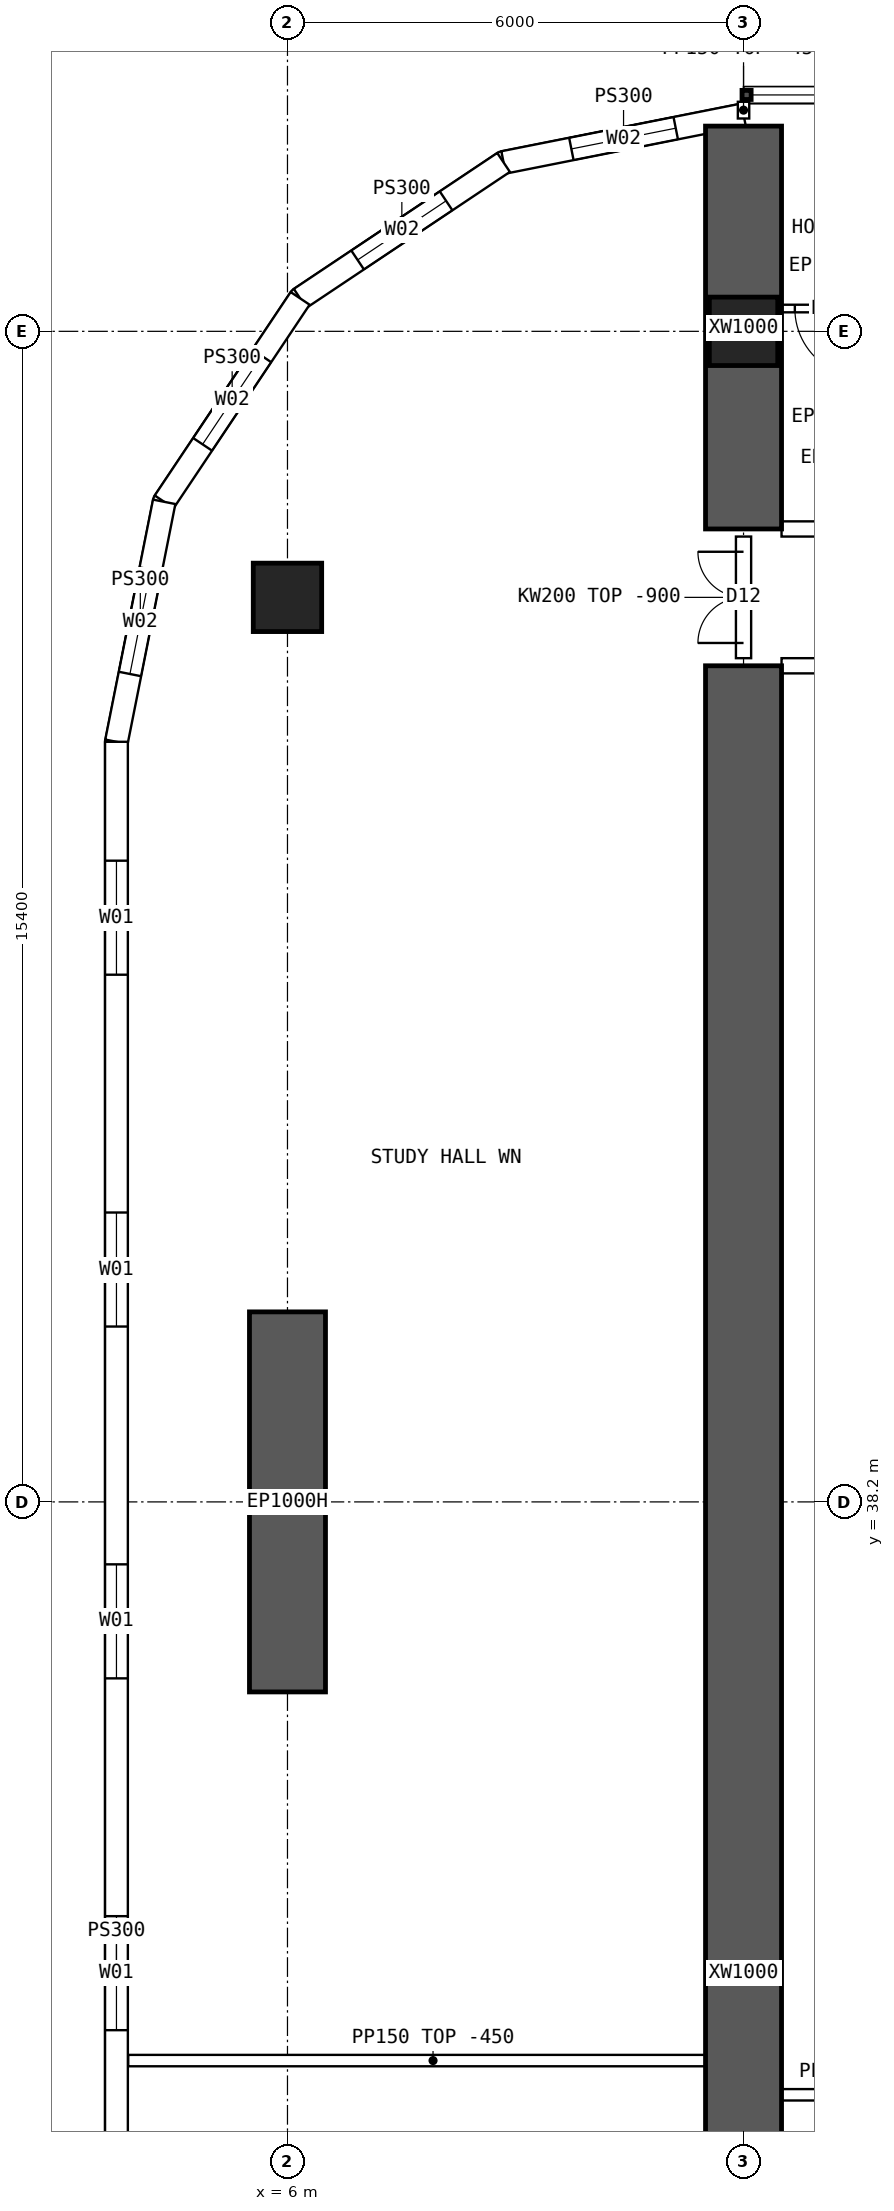
"""IFC4 building model, lengths in metres.
Left out: names, types, materials, properties, quantities, classifications, styles, units other than length and angle.
Written with IfcOpenShell. Run it as: python <this file> out.ifc"""

import sys

from ifc_helpers import new_model, si_unit, direction, frame, frame_2d, origin, origin_2d, place, context, subcontext, project, spatial, polyline, rectangle, hollow_rectangle, outline, extrude, element, fill, save


model = new_model("IFC4")
c1 = context("Model", 3, precision=1e-05, world=origin(), true_north=direction((0.0, 1.0)))
c2 = subcontext(c1, "Body", "Model", "MODEL_VIEW")
j1 = project(units=[si_unit("LENGTHUNIT", "METRE"), si_unit("PLANEANGLEUNIT", "RADIAN")], contexts=[c1])
p1 = place(None, origin())
s1 = spatial("IfcSite", under=j1, at=p1, CompositionType="ELEMENT")
p2 = place(p1, origin())
s2 = spatial("IfcBuilding", under=s1, at=p2, CompositionType="ELEMENT")
p3 = place(p2, frame((0.0, 0.0, 50.2)))
s3 = spatial("IfcBuildingStorey", under=s2, at=p3, CompositionType="ELEMENT", Elevation=50.2)
for number, where, z_axis, x_axis in (
    (1, (12.0, 53.6, 0.0), (0.0, 0.0, 1.0), (1.0, 0.0, 0.0)),
    (2, (6.0, 50.1, 0.0), (0.0, 0.0, 1.0), (1.0, 0.0, 0.0)),
):
    element("IfcColumn", number, at=place(p3, frame(where, z_axis=z_axis, x_axis=x_axis)), inside=s3, PredefinedType="COLUMN", context=c2, shape_type="SweptSolid", body=[
        extrude(hollow_rectangle(XDim=0.9, YDim=0.9, WallThickness=0.09, at=origin_2d()), origin(), (0.0, 0.0, 1.0), 3.75),
    ])
p4 = place(p3, frame((6.0, 35.7, 0.0), z_axis=(0.0, 0.0, 1.0), x_axis=(0.0, 1.0, 0.0)))
e3 = element("IfcWall", 3, at=p4, inside=s3, PredefinedType="SHEAR", context=c2, shape_type="SweptSolid", body=[
    extrude(rectangle(XDim=5.0, YDim=1.0, at=frame_2d((2.5, 0.0))), origin(), (0.0, 0.0, 1.0), 3.75),
])
p5 = place(p3, frame((12.0, 51.0, 0.0), z_axis=(0.0, 0.0, 1.0), x_axis=(0.0, 1.0, 0.0)))
e4 = element("IfcWall", 4, at=p5, inside=s3, PredefinedType="SHEAR", context=c2, shape_type="SweptSolid", body=[
    extrude(rectangle(XDim=5.3, YDim=1.0, at=frame_2d((2.65, 0.0))), origin(), (0.0, 0.0, 1.0), 3.75),
])
p6 = place(p3, frame((12.0, 14.8, 0.0), z_axis=(0.0, 0.0, 1.0), x_axis=(0.0, 1.0, 0.0)))
e5 = element("IfcWall", 5, at=p6, inside=s3, PredefinedType="SHEAR", context=c2, shape_type="SweptSolid", body=[
    extrude(rectangle(XDim=34.4, YDim=1.0, at=frame_2d((17.2, 0.0))), origin(), (0.0, 0.0, 1.0), 3.75),
])
p7 = place(p3, frame((3.75, 48.2, 0.0), z_axis=(0.0, 0.0, 1.0), x_axis=(0.0, -1.0, 0.0)))
e6 = element("IfcWall", 6, at=p7, inside=s3, PredefinedType="SOLIDWALL", context=c2, shape_type="SweptSolid", body=[
    extrude(outline(polyline([(-0.015, -0.15), (32.415, -0.15), (32.385, 0.15), (0.015, 0.15), (-0.015, -0.15)])), origin(), (0.0, 0.0, 1.0), 3.3),
])
p8 = place(p7, frame((1.564, 0.0, 0.9)))
e7 = element("IfcOpeningElement", 7, at=p8, cuts=e6, PredefinedType="OPENING", context=c2, shape_type="SweptSolid", body=[
    extrude(rectangle(XDim=1.5, YDim=2.0, at=frame_2d((0.75, 1.0))), frame((0.0, 0.16, 0.0), z_axis=(0.0, -1.0, 0.0), x_axis=(1.0, 0.0, 0.0)), (0.0, 0.0, 1.0), 0.32),
])
p9 = place(p7, frame((6.193, 0.0, 0.9)))
e8 = element("IfcOpeningElement", 8, at=p9, cuts=e6, PredefinedType="OPENING", context=c2, shape_type="SweptSolid", body=[
    extrude(rectangle(XDim=1.5, YDim=2.0, at=frame_2d((0.75, 1.0))), frame((0.0, 0.16, 0.0), z_axis=(0.0, -1.0, 0.0), x_axis=(1.0, 0.0, 0.0)), (0.0, 0.0, 1.0), 0.32),
])
p10 = place(p7, frame((10.822, 0.0, 0.9)))
e9 = element("IfcOpeningElement", 9, at=p10, cuts=e6, PredefinedType="OPENING", context=c2, shape_type="SweptSolid", body=[
    extrude(rectangle(XDim=1.5, YDim=2.0, at=frame_2d((0.75, 1.0))), frame((0.0, 0.16, 0.0), z_axis=(0.0, -1.0, 0.0), x_axis=(1.0, 0.0, 0.0)), (0.0, 0.0, 1.0), 0.32),
])
p11 = place(p7, frame((15.45, 0.0, 0.9)))
e10 = element("IfcOpeningElement", 10, at=p11, cuts=e6, PredefinedType="OPENING", context=c2, shape_type="SweptSolid", body=[
    extrude(rectangle(XDim=1.5, YDim=2.0, at=frame_2d((0.75, 1.0))), frame((0.0, 0.16, 0.0), z_axis=(0.0, -1.0, 0.0), x_axis=(1.0, 0.0, 0.0)), (0.0, 0.0, 1.0), 0.32),
])
p12 = place(p7, frame((20.079, 0.0, 0.9)))
e11 = element("IfcOpeningElement", 11, at=p12, cuts=e6, PredefinedType="OPENING", context=c2, shape_type="SweptSolid", body=[
    extrude(rectangle(XDim=1.5, YDim=2.0, at=frame_2d((0.75, 1.0))), frame((0.0, 0.16, 0.0), z_axis=(0.0, -1.0, 0.0), x_axis=(1.0, 0.0, 0.0)), (0.0, 0.0, 1.0), 0.32),
])
p13 = place(p7, frame((24.707, 0.0, 0.9)))
e12 = element("IfcOpeningElement", 12, at=p13, cuts=e6, PredefinedType="OPENING", context=c2, shape_type="SweptSolid", body=[
    extrude(rectangle(XDim=1.5, YDim=2.0, at=frame_2d((0.75, 1.0))), frame((0.0, 0.16, 0.0), z_axis=(0.0, -1.0, 0.0), x_axis=(1.0, 0.0, 0.0)), (0.0, 0.0, 1.0), 0.32),
])
p14 = place(p7, frame((29.336, 0.0, 0.9)))
e13 = element("IfcOpeningElement", 13, at=p14, cuts=e6, PredefinedType="OPENING", context=c2, shape_type="SweptSolid", body=[
    extrude(rectangle(XDim=1.5, YDim=2.0, at=frame_2d((0.75, 1.0))), frame((0.0, 0.16, 0.0), z_axis=(0.0, -1.0, 0.0), x_axis=(1.0, 0.0, 0.0)), (0.0, 0.0, 1.0), 0.32),
])
p15 = place(p3, frame((12.0, 56.45, 0.0), z_axis=(0.0, 0.0, 1.0), x_axis=(-0.980787251524, -0.195080412259, 0.0)))
e14 = element("IfcWall", 14, at=p15, inside=s3, PredefinedType="SOLIDWALL", context=c2, shape_type="SweptSolid", body=[
    extrude(outline(polyline([(-0.03, -0.15), (3.249, -0.15), (3.189, 0.15), (0.03, 0.15), (-0.03, -0.15)])), origin(), (0.0, 0.0, 1.0), 3.3),
])
p16 = place(p15, frame((0.909, 0.0, 0.9)))
e15 = element("IfcOpeningElement", 15, at=p16, cuts=e14, PredefinedType="OPENING", context=c2, shape_type="SweptSolid", body=[
    extrude(rectangle(XDim=1.4, YDim=1.8, at=frame_2d((0.7, 0.9))), frame((0.0, 0.16, 0.0), z_axis=(0.0, -1.0, 0.0), x_axis=(1.0, 0.0, 0.0)), (0.0, 0.0, 1.0), 0.32),
])
p17 = place(p3, frame((8.843, 55.822, 0.0), z_axis=(0.0, 0.0, 1.0), x_axis=(-0.831478105043, -0.555557522525, 0.0)))
e16 = element("IfcWall", 16, at=p17, inside=s3, PredefinedType="SOLIDWALL", context=c2, shape_type="SweptSolid", body=[
    extrude(outline(polyline([(-0.03, -0.15), (3.249, -0.15), (3.189, 0.15), (0.03, 0.15), (-0.03, -0.15)])), origin(), (0.0, 0.0, 1.0), 3.3),
])
p18 = place(p17, frame((0.909, 0.0, 0.9)))
e17 = element("IfcOpeningElement", 17, at=p18, cuts=e16, PredefinedType="OPENING", context=c2, shape_type="SweptSolid", body=[
    extrude(rectangle(XDim=1.4, YDim=1.8, at=frame_2d((0.7, 0.9))), frame((0.0, 0.16, 0.0), z_axis=(0.0, -1.0, 0.0), x_axis=(1.0, 0.0, 0.0)), (0.0, 0.0, 1.0), 0.32),
])
p19 = place(p3, frame((6.167, 54.034, 0.0), z_axis=(0.0, 0.0, 1.0), x_axis=(-0.555609954424, -0.831443069936, 0.0)))
e18 = element("IfcWall", 18, at=p19, inside=s3, PredefinedType="SOLIDWALL", context=c2, shape_type="SweptSolid", body=[
    extrude(outline(polyline([(-0.03, -0.15), (3.249, -0.15), (3.189, 0.15), (0.03, 0.15), (-0.03, -0.15)])), origin(), (0.0, 0.0, 1.0), 3.3),
])
p20 = place(p19, frame((0.909, 0.0, 0.9)))
e19 = element("IfcOpeningElement", 19, at=p20, cuts=e18, PredefinedType="OPENING", context=c2, shape_type="SweptSolid", body=[
    extrude(rectangle(XDim=1.4, YDim=1.8, at=frame_2d((0.7, 0.9))), frame((0.0, 0.16, 0.0), z_axis=(0.0, -1.0, 0.0), x_axis=(1.0, 0.0, 0.0)), (0.0, 0.0, 1.0), 0.32),
])
p21 = place(p3, frame((4.378, 51.357, 0.0), z_axis=(0.0, 0.0, 1.0), x_axis=(-0.195065901187, -0.980790137692, 0.0)))
e20 = element("IfcWall", 20, at=p21, inside=s3, PredefinedType="SOLIDWALL", context=c2, shape_type="SweptSolid", body=[
    extrude(outline(polyline([(-0.03, -0.15), (3.234, -0.15), (3.204, 0.15), (0.03, 0.15), (-0.03, -0.15)])), origin(), (0.0, 0.0, 1.0), 3.3),
])
p22 = place(p21, frame((0.909, 0.0, 0.9)))
e21 = element("IfcOpeningElement", 21, at=p22, cuts=e20, PredefinedType="OPENING", context=c2, shape_type="SweptSolid", body=[
    extrude(rectangle(XDim=1.4, YDim=1.8, at=frame_2d((0.7, 0.9))), frame((0.0, 0.16, 0.0), z_axis=(0.0, -1.0, 0.0), x_axis=(1.0, 0.0, 0.0)), (0.0, 0.0, 1.0), 0.32),
])
p23 = place(p3, frame((12.5, 51.0, 0.0), z_axis=(0.0, 0.0, 1.0), x_axis=(1.0, 0.0, 0.0)))
e22 = element("IfcWall", 22, at=p23, inside=s3, PredefinedType="SOLIDWALL", context=c2, shape_type="SweptSolid", body=[
    extrude(outline(polyline([(0.0, 0.0), (5.0, 0.0), (5.0, 2.9), (0.0, 2.9), (0.0, 0.0)])), frame((0.0, 0.1, 0.0), z_axis=(0.0, -1.0, 0.0), x_axis=(1.0, 0.0, 0.0)), (0.0, 0.0, 1.0), 0.2),
])
p24 = place(p23, frame((1.3, 0.0, 0.0)))
e23 = element("IfcOpeningElement", 23, at=p24, cuts=e22, PredefinedType="OPENING", context=c2, shape_type="SweptSolid", body=[
    extrude(rectangle(XDim=0.9, YDim=2.1, at=frame_2d((0.45, 1.05))), frame((0.0, 0.11, 0.0), z_axis=(0.0, -1.0, 0.0), x_axis=(1.0, 0.0, 0.0)), (0.0, 0.0, 1.0), 0.22),
])
p25 = place(p23, frame((2.675, 0.0, 0.0)))
e24 = element("IfcOpeningElement", 24, at=p25, cuts=e22, PredefinedType="OPENING", context=c2, shape_type="SweptSolid", body=[
    extrude(rectangle(XDim=0.9, YDim=2.1, at=frame_2d((0.45, 1.05))), frame((0.0, 0.11, 0.0), z_axis=(0.0, -1.0, 0.0), x_axis=(1.0, 0.0, 0.0)), (0.0, 0.0, 1.0), 0.22),
])
p26 = place(p3, frame((12.5, 49.2, 0.0), z_axis=(0.0, 0.0, 1.0), x_axis=(1.0, 0.0, 0.0)))
e25 = element("IfcWall", 25, at=p26, inside=s3, PredefinedType="SOLIDWALL", context=c2, shape_type="SweptSolid", body=[
    extrude(rectangle(XDim=5.0, YDim=0.2, at=frame_2d((2.5, 0.0))), origin(), (0.0, 0.0, 1.0), 3.3),
])
p27 = place(p26, frame((3.3, 0.0, 0.0)))
e26 = element("IfcOpeningElement", 26, at=p27, cuts=e25, PredefinedType="OPENING", context=c2, shape_type="SweptSolid", body=[
    extrude(rectangle(XDim=1.6, YDim=2.1, at=frame_2d((0.8, 1.05))), frame((0.0, 0.11, 0.0), z_axis=(0.0, -1.0, 0.0), x_axis=(1.0, 0.0, 0.0)), (0.0, 0.0, 1.0), 0.22),
])
p28 = place(p3, frame((12.45, 53.9, 0.0), z_axis=(0.0, 0.0, 1.0), x_axis=(1.0, 0.0, 0.0)))
e27 = element("IfcWall", 27, at=p28, inside=s3, PredefinedType="PARTITIONING", context=c2, shape_type="SweptSolid", body=[
    extrude(rectangle(XDim=1.3, YDim=0.1, at=frame_2d((0.65, 0.0))), origin(), (0.0, 0.0, 1.0), 3.3),
])
p29 = place(p28, frame((0.225, 0.0, 0.0)))
e28 = element("IfcOpeningElement", 28, at=p29, cuts=e27, PredefinedType="OPENING", context=c2, shape_type="SweptSolid", body=[
    extrude(rectangle(XDim=0.9, YDim=2.1, at=frame_2d((0.45, 1.05))), frame((0.0, 0.06, 0.0), z_axis=(0.0, -1.0, 0.0), x_axis=(1.0, 0.0, 0.0)), (0.0, 0.0, 1.0), 0.12),
])
p30 = place(p3, frame((12.0, 30.4, 0.0), z_axis=(0.0, 0.0, 1.0), x_axis=(1.0, 0.0, 0.0)))
e29 = element("IfcWall", 29, at=p30, inside=s3, PredefinedType="PARTITIONING", context=c2, shape_type="SweptSolid", body=[
    extrude(rectangle(XDim=3.6, YDim=0.15, at=frame_2d((1.8, 0.0))), origin(), (0.0, 0.0, 1.0), 3.3),
])
p31 = place(p3, frame((3.905, 30.85, 0.0), z_axis=(0.0, 0.0, 1.0), x_axis=(1.0, 0.0, 0.0)))
e30 = element("IfcWall", 30, at=p31, inside=s3, PredefinedType="PARTITIONING", context=c2, shape_type="SweptSolid", body=[
    extrude(outline(polyline([(0.0, 0.0), (8.02, 0.0), (8.02, 3.3), (2.397, 3.3), (2.395, 2.85), (1.797, 2.85), (1.795, 3.3), (0.0, 3.3), (0.0, 0.0)])), frame((0.0, 0.075, 0.0), z_axis=(0.0, -1.0, 0.0), x_axis=(1.0, 0.0, 0.0)), (0.0, 0.0, 1.0), 0.15),
])
p32 = place(p3, frame((12.0, 49.3, 0.0), z_axis=(0.0, 0.0, 1.0), x_axis=(0.0, 1.0, 0.0)))
e31 = element("IfcWall", 31, at=p32, inside=s3, PredefinedType="SOLIDWALL", context=c2, shape_type="SweptSolid", body=[
    extrude(outline(polyline([(0.0, 0.0), (1.6, 0.0), (1.6, 2.85), (0.0, 2.85), (0.0, 0.0)])), frame((0.0, 0.1, 0.0), z_axis=(0.0, -1.0, 0.0), x_axis=(1.0, 0.0, 0.0)), (0.0, 0.0, 1.0), 0.2),
])
p33 = place(p32, frame((0.2, 0.0, 0.0)))
e32 = element("IfcOpeningElement", 32, at=p33, cuts=e31, PredefinedType="OPENING", context=c2, shape_type="SweptSolid", body=[
    extrude(rectangle(XDim=1.2, YDim=2.1, at=frame_2d((0.6, 1.05))), frame((0.0, 0.11, 0.0), z_axis=(0.0, -1.0, 0.0), x_axis=(1.0, 0.0, 0.0)), (0.0, 0.0, 1.0), 0.22),
])
p34 = place(p3, frame((12.0, 56.4, 0.0), z_axis=(0.0, 0.0, 1.0), x_axis=(0.0, 1.0, 0.0)))
e33 = element("IfcWall", 33, at=p34, inside=s3, PredefinedType="PARTITIONING", context=c2, shape_type="SweptSolid", body=[
    extrude(rectangle(XDim=0.22, YDim=0.15, at=frame_2d((0.11, 0.0))), origin(), (0.0, 0.0, 1.0), 3.3),
])
p35 = place(p8, origin())
e34 = element("IfcWindow", 34, at=p35, inside=s3, PartitioningType="SINGLE_PANEL", PredefinedType="WINDOW", context=c2, shape_type="SweptSolid", body=[
    extrude(rectangle(XDim=1.5, YDim=2.0, at=frame_2d((0.75, 1.0))), frame((0.0, 0.03, 0.0), z_axis=(0.0, -1.0, 0.0), x_axis=(1.0, 0.0, 0.0)), (0.0, 0.0, 1.0), 0.06),
])
fill(e7, e34)
p36 = place(p9, origin())
e35 = element("IfcWindow", 35, at=p36, inside=s3, PartitioningType="SINGLE_PANEL", PredefinedType="WINDOW", context=c2, shape_type="SweptSolid", body=[
    extrude(rectangle(XDim=1.5, YDim=2.0, at=frame_2d((0.75, 1.0))), frame((0.0, 0.03, 0.0), z_axis=(0.0, -1.0, 0.0), x_axis=(1.0, 0.0, 0.0)), (0.0, 0.0, 1.0), 0.06),
])
fill(e8, e35)
p37 = place(p10, origin())
e36 = element("IfcWindow", 36, at=p37, inside=s3, PartitioningType="SINGLE_PANEL", PredefinedType="WINDOW", context=c2, shape_type="SweptSolid", body=[
    extrude(rectangle(XDim=1.5, YDim=2.0, at=frame_2d((0.75, 1.0))), frame((0.0, 0.03, 0.0), z_axis=(0.0, -1.0, 0.0), x_axis=(1.0, 0.0, 0.0)), (0.0, 0.0, 1.0), 0.06),
])
fill(e9, e36)
p38 = place(p11, origin())
e37 = element("IfcWindow", 37, at=p38, inside=s3, PartitioningType="SINGLE_PANEL", PredefinedType="WINDOW", context=c2, shape_type="SweptSolid", body=[
    extrude(rectangle(XDim=1.5, YDim=2.0, at=frame_2d((0.75, 1.0))), frame((0.0, 0.03, 0.0), z_axis=(0.0, -1.0, 0.0), x_axis=(1.0, 0.0, 0.0)), (0.0, 0.0, 1.0), 0.06),
])
fill(e10, e37)
p39 = place(p16, origin())
e38 = element("IfcWindow", 38, at=p39, inside=s3, PartitioningType="SINGLE_PANEL", PredefinedType="WINDOW", context=c2, shape_type="SweptSolid", body=[
    extrude(rectangle(XDim=1.4, YDim=1.8, at=frame_2d((0.7, 0.9))), frame((0.0, 0.03, 0.0), z_axis=(0.0, -1.0, 0.0), x_axis=(1.0, 0.0, 0.0)), (0.0, 0.0, 1.0), 0.06),
])
fill(e15, e38)
p40 = place(p18, origin())
e39 = element("IfcWindow", 39, at=p40, inside=s3, PartitioningType="SINGLE_PANEL", PredefinedType="WINDOW", context=c2, shape_type="SweptSolid", body=[
    extrude(rectangle(XDim=1.4, YDim=1.8, at=frame_2d((0.7, 0.9))), frame((0.0, 0.03, 0.0), z_axis=(0.0, -1.0, 0.0), x_axis=(1.0, 0.0, 0.0)), (0.0, 0.0, 1.0), 0.06),
])
fill(e17, e39)
p41 = place(p20, origin())
e40 = element("IfcWindow", 40, at=p41, inside=s3, PartitioningType="SINGLE_PANEL", PredefinedType="WINDOW", context=c2, shape_type="SweptSolid", body=[
    extrude(rectangle(XDim=1.4, YDim=1.8, at=frame_2d((0.7, 0.9))), frame((0.0, 0.03, 0.0), z_axis=(0.0, -1.0, 0.0), x_axis=(1.0, 0.0, 0.0)), (0.0, 0.0, 1.0), 0.06),
])
fill(e19, e40)
p42 = place(p22, origin())
e41 = element("IfcWindow", 41, at=p42, inside=s3, PartitioningType="SINGLE_PANEL", PredefinedType="WINDOW", context=c2, shape_type="SweptSolid", body=[
    extrude(rectangle(XDim=1.4, YDim=1.8, at=frame_2d((0.7, 0.9))), frame((0.0, 0.03, 0.0), z_axis=(0.0, -1.0, 0.0), x_axis=(1.0, 0.0, 0.0)), (0.0, 0.0, 1.0), 0.06),
])
fill(e21, e41)
p43 = place(p29, origin())
e42 = element("IfcDoor", 42, at=p43, inside=s3, OperationType="SINGLE_SWING_RIGHT", PredefinedType="DOOR", context=c2, shape_type="SweptSolid", body=[
    extrude(rectangle(XDim=0.9, YDim=2.1, at=frame_2d((0.45, 1.05))), frame((0.0, 0.025, 0.0), z_axis=(0.0, -1.0, 0.0), x_axis=(1.0, 0.0, 0.0)), (0.0, 0.0, 1.0), 0.05),
])
fill(e28, e42)
p44 = place(p33, origin())
e43 = element("IfcDoor", 43, at=p44, inside=s3, OperationType="DOUBLE_DOOR_SINGLE_SWING", PredefinedType="DOOR", context=c2, shape_type="SweptSolid", body=[
    extrude(rectangle(XDim=1.2, YDim=2.1, at=frame_2d((0.6, 1.05))), frame((0.0, 0.025, 0.0), z_axis=(0.0, -1.0, 0.0), x_axis=(1.0, 0.0, 0.0)), (0.0, 0.0, 1.0), 0.05),
])
fill(e32, e43)
save(model, sys.argv[1])
